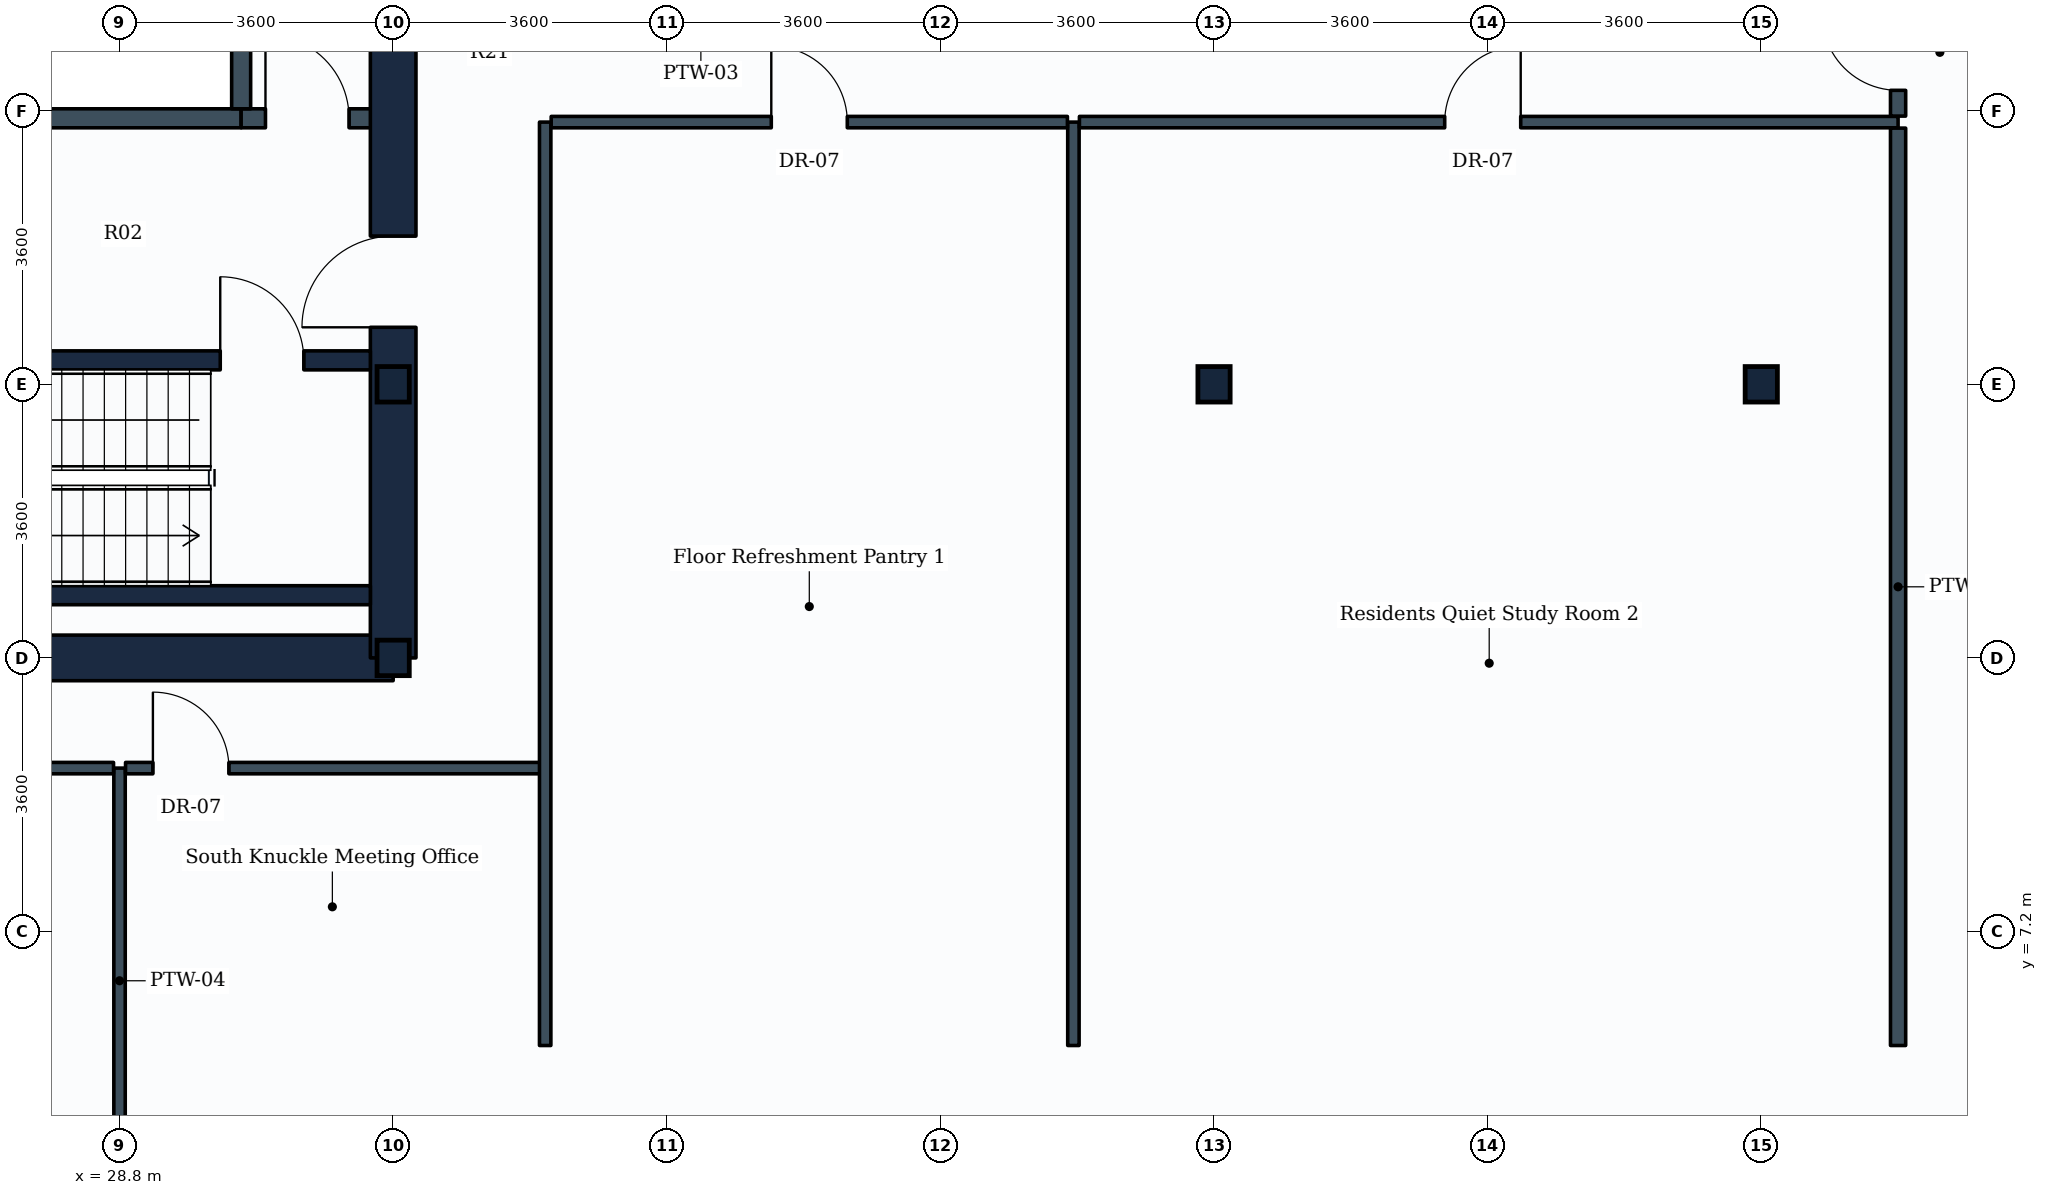
"""IFC4 building model, lengths in metres.
Left out: names, types, materials, properties, quantities, classifications, styles, units other than length and angle.
Written with IfcOpenShell. Run it as: python <this file> out.ifc"""

import sys

from ifc_helpers import new_model, si_unit, direction, frame, frame_2d, origin, origin_2d, place, context, subcontext, project, spatial, rectangle, i_section, extrude, element, fill, save


model = new_model("IFC4")
c1 = context("Model", 3, precision=1e-05, world=origin(), true_north=direction((0.0, 1.0)))
c2 = subcontext(c1, "Body", "Model", "MODEL_VIEW")
j1 = project(units=[si_unit("LENGTHUNIT", "METRE"), si_unit("PLANEANGLEUNIT", "RADIAN")], contexts=[c1])
p1 = place(None, origin())
s1 = spatial("IfcSite", under=j1, at=p1, CompositionType="ELEMENT")
p2 = place(p1, origin())
s2 = spatial("IfcBuilding", under=s1, at=p2, CompositionType="ELEMENT")
p3 = place(p2, frame((0.0, 0.0, 103.5)))
s3 = spatial("IfcBuildingStorey", under=s2, at=p3, CompositionType="ELEMENT", Elevation=103.5)
for number, where, z_axis, x_axis in (
    (1, (32.4, 10.8, 0.0), (0.0, 0.0, 1.0), (1.0, 0.0, 0.0)),
    (2, (32.4, 14.4, 0.0), (0.0, 0.0, 1.0), (1.0, 0.0, 0.0)),
    (3, (43.2, 14.4, 0.0), (0.0, 0.0, 1.0), (1.0, 0.0, 0.0)),
    (4, (50.4, 14.4, 0.0), (0.0, 0.0, 1.0), (1.0, 0.0, 0.0)),
):
    element("IfcColumn", number, at=place(p3, frame(where, z_axis=z_axis, x_axis=x_axis)), inside=s3, PredefinedType="COLUMN", context=c2, shape_type="SweptSolid", body=[
        extrude(i_section(OverallWidth=0.424, OverallDepth=0.467, WebThickness=0.033, FlangeThickness=0.053, FilletRadius=0.015, at=origin_2d()), origin(), (0.0, 0.0, 1.0), 3.9),
    ])
p4 = place(p3, frame((14.4, 10.8, 0.0), z_axis=(0.0, 0.0, 1.0), x_axis=(1.0, 0.0, 0.0)))
e5 = element("IfcWall", 5, at=p4, inside=s3, PredefinedType="SHEAR", context=c2, shape_type="SweptSolid", body=[
    extrude(rectangle(XDim=18.0, YDim=0.6, at=frame_2d((9.0, 0.0))), origin(), (0.0, 0.0, 1.0), 3.65),
])
p5 = place(p3, frame((32.4, 10.8, 0.0), z_axis=(0.0, 0.0, 1.0), x_axis=(0.0, 1.0, 0.0)))
e6 = element("IfcWall", 6, at=p5, inside=s3, PredefinedType="SHEAR", context=c2, shape_type="SweptSolid", body=[
    extrude(rectangle(XDim=14.4, YDim=0.6, at=frame_2d((7.2, 0.0))), origin(), (0.0, 0.0, 1.0), 3.65),
])
p6 = place(p5, frame((4.35, 0.0, 0.0)))
e7 = element("IfcOpeningElement", 7, at=p6, cuts=e6, PredefinedType="OPENING", context=c2, shape_type="SweptSolid", body=[
    extrude(rectangle(XDim=1.2, YDim=2.1, at=frame_2d((0.6, 1.05))), frame((0.0, 0.31, 0.0), z_axis=(0.0, -1.0, 0.0), x_axis=(1.0, 0.0, 0.0)), (0.0, 0.0, 1.0), 0.62),
])
p7 = place(p5, frame((10.0, 0.0, 0.0)))
e8 = element("IfcOpeningElement", 8, at=p7, cuts=e6, PredefinedType="OPENING", context=c2, shape_type="SweptSolid", body=[
    extrude(rectangle(XDim=1.2, YDim=2.1, at=frame_2d((0.6, 1.05))), frame((0.0, 0.31, 0.0), z_axis=(0.0, -1.0, 0.0), x_axis=(1.0, 0.0, 0.0)), (0.0, 0.0, 1.0), 0.62),
])
p8 = place(p3, frame((23.35, 11.625, 0.0), z_axis=(0.0, 0.0, 1.0), x_axis=(1.0, 0.0, 0.0)))
e9 = element("IfcWall", 9, at=p8, inside=s3, PredefinedType="SHEAR", context=c2, shape_type="SweptSolid", body=[
    extrude(rectangle(XDim=8.75, YDim=0.25, at=frame_2d((4.375, 0.0))), origin(), (0.0, 0.0, 1.0), 3.65),
])
p9 = place(p3, frame((23.35, 14.715, 0.0), z_axis=(0.0, 0.0, 1.0), x_axis=(1.0, 0.0, 0.0)))
e10 = element("IfcWall", 10, at=p9, inside=s3, PredefinedType="SHEAR", context=c2, shape_type="SweptSolid", body=[
    extrude(rectangle(XDim=8.75, YDim=0.25, at=frame_2d((4.375, 0.0))), origin(), (0.0, 0.0, 1.0), 3.65),
])
p10 = place(p9, frame((6.775, 0.0, 0.0)))
e11 = element("IfcOpeningElement", 11, at=p10, cuts=e10, PredefinedType="OPENING", context=c2, shape_type="SweptSolid", body=[
    extrude(rectangle(XDim=1.1, YDim=2.1, at=frame_2d((0.55, 1.05))), frame((0.0, 0.135, 0.0), z_axis=(0.0, -1.0, 0.0), x_axis=(1.0, 0.0, 0.0)), (0.0, 0.0, 1.0), 0.27),
])
p11 = place(p3, frame((21.88, 17.9, 0.0), z_axis=(0.0, 0.0, 1.0), x_axis=(1.0, 0.0, 0.0)))
e12 = element("IfcWall", 12, at=p11, inside=s3, PredefinedType="PARTITIONING", context=c2, shape_type="SweptSolid", body=[
    extrude(rectangle(XDim=8.52, YDim=0.25, at=frame_2d((4.26, 0.0))), origin(), (0.0, 0.0, 1.0), 3.635),
])
p12 = place(p3, frame((30.4, 17.9, 0.0), z_axis=(0.0, 0.0, 1.0), x_axis=(1.0, 0.0, 0.0)))
e13 = element("IfcWall", 13, at=p12, inside=s3, PredefinedType="PARTITIONING", context=c2, shape_type="SweptSolid", body=[
    extrude(rectangle(XDim=1.75, YDim=0.25, at=frame_2d((0.875, 0.0))), origin(), (0.0, 0.0, 1.0), 3.635),
])
p13 = place(p12, frame((0.32, 0.0, 0.0)))
e14 = element("IfcOpeningElement", 14, at=p13, cuts=e13, PredefinedType="OPENING", context=c2, shape_type="SweptSolid", body=[
    extrude(rectangle(XDim=1.1, YDim=2.1, at=frame_2d((0.55, 1.05))), frame((0.0, 0.135, 0.0), z_axis=(0.0, -1.0, 0.0), x_axis=(1.0, 0.0, 0.0)), (0.0, 0.0, 1.0), 0.27),
])
p14 = place(p3, frame((30.4, 18.025, 0.0), z_axis=(0.0, 0.0, 1.0), x_axis=(0.0, 1.0, 0.0)))
e15 = element("IfcWall", 15, at=p14, inside=s3, PredefinedType="PARTITIONING", context=c2, shape_type="SweptSolid", body=[
    extrude(rectangle(XDim=2.27, YDim=0.25, at=frame_2d((1.135, 0.0))), origin(), (0.0, 0.0, 1.0), 3.635),
])
p15 = place(p3, frame((28.8, 9.35, 0.0), z_axis=(0.0, 0.0, 1.0), x_axis=(0.0, -1.0, 0.0)))
e16 = element("IfcWall", 16, at=p15, inside=s3, PredefinedType="PARTITIONING", context=c2, shape_type="SweptSolid", body=[
    extrude(rectangle(XDim=5.596, YDim=0.15, at=frame_2d((2.798, 0.0))), origin(), (0.0, 0.0, 1.0), 3.635),
])
p16 = place(p3, frame((12.95, 9.35, 0.0), z_axis=(0.0, 0.0, 1.0), x_axis=(1.0, 0.0, 0.0)))
e17 = element("IfcWall", 17, at=p16, inside=s3, PredefinedType="PARTITIONING", context=c2, shape_type="SweptSolid", body=[
    extrude(rectangle(XDim=15.771, YDim=0.15, at=frame_2d((7.885, 0.0))), origin(), (0.0, 0.0, 1.0), 3.18),
])
p17 = place(p16, frame((4.836, 0.0, 0.0)))
e18 = element("IfcOpeningElement", 18, at=p17, cuts=e17, PredefinedType="OPENING", context=c2, shape_type="SweptSolid", body=[
    extrude(rectangle(XDim=1.0, YDim=2.1, at=frame_2d((0.5, 1.05))), frame((0.0, 0.085, 0.0), z_axis=(0.0, -1.0, 0.0), x_axis=(1.0, 0.0, 0.0)), (0.0, 0.0, 1.0), 0.17),
])
p18 = place(p3, frame((28.879, 9.35, 0.0), z_axis=(0.0, 0.0, 1.0), x_axis=(1.0, 0.0, 0.0)))
e19 = element("IfcWall", 19, at=p18, inside=s3, PredefinedType="PARTITIONING", context=c2, shape_type="SweptSolid", body=[
    extrude(rectangle(XDim=5.521, YDim=0.15, at=frame_2d((2.76, 0.0))), origin(), (0.0, 0.0, 1.0), 3.635),
])
p19 = place(p18, frame((0.36, 0.0, 0.0)))
e20 = element("IfcOpeningElement", 20, at=p19, cuts=e19, PredefinedType="OPENING", context=c2, shape_type="SweptSolid", body=[
    extrude(rectangle(XDim=1.0, YDim=2.1, at=frame_2d((0.5, 1.05))), frame((0.0, 0.085, 0.0), z_axis=(0.0, -1.0, 0.0), x_axis=(1.0, 0.0, 0.0)), (0.0, 0.0, 1.0), 0.17),
])
for number, where, z_axis, x_axis in (
    (21, (34.4, 5.7, 0.0), (0.0, 0.0, 1.0), (0.0, 1.0, 0.0)),
    (22, (41.35, 5.7, 0.0), (0.0, 0.0, 1.0), (0.0, 1.0, 0.0)),
):
    element("IfcWall", number, at=place(p3, frame(where, z_axis=z_axis, x_axis=x_axis)), inside=s3, PredefinedType="PARTITIONING", context=c2, shape_type="SweptSolid", body=[
        extrude(rectangle(XDim=12.15, YDim=0.15, at=frame_2d((6.075, 0.0))), origin(), (0.0, 0.0, 1.0), 3.18),
    ])
p20 = place(p3, frame((34.479, 17.85, 0.0), z_axis=(0.0, 0.0, 1.0), x_axis=(1.0, 0.0, 0.0)))
e23 = element("IfcWall", 23, at=p20, inside=s3, PredefinedType="PARTITIONING", context=c2, shape_type="SweptSolid", body=[
    extrude(rectangle(XDim=6.792, YDim=0.15, at=frame_2d((3.396, 0.0))), origin(), (0.0, 0.0, 1.0), 3.18),
])
p21 = place(p20, frame((2.896, 0.0, 0.0)))
e24 = element("IfcOpeningElement", 24, at=p21, cuts=e23, PredefinedType="OPENING", context=c2, shape_type="SweptSolid", body=[
    extrude(rectangle(XDim=1.0, YDim=2.1, at=frame_2d((0.5, 1.05))), frame((0.0, 0.085, 0.0), z_axis=(0.0, -1.0, 0.0), x_axis=(1.0, 0.0, 0.0)), (0.0, 0.0, 1.0), 0.17),
])
p22 = place(p3, frame((41.429, 17.85, 0.0), z_axis=(0.0, 0.0, 1.0), x_axis=(1.0, 0.0, 0.0)))
e25 = element("IfcWall", 25, at=p22, inside=s3, PredefinedType="PARTITIONING", context=c2, shape_type="SweptSolid", body=[
    extrude(rectangle(XDim=10.771, YDim=0.15, at=frame_2d((5.385, 0.0))), origin(), (0.0, 0.0, 1.0), 3.18),
])
p23 = place(p22, frame((4.806, 0.0, 0.0)))
e26 = element("IfcOpeningElement", 26, at=p23, cuts=e25, PredefinedType="OPENING", context=c2, shape_type="SweptSolid", body=[
    extrude(rectangle(XDim=1.0, YDim=2.1, at=frame_2d((0.5, 1.05))), frame((0.0, 0.085, 0.0), z_axis=(0.0, -1.0, 0.0), x_axis=(1.0, 0.0, 0.0)), (0.0, 0.0, 1.0), 0.17),
])
p24 = place(p3, frame((52.2, 5.7, 0.0), z_axis=(0.0, 0.0, 1.0), x_axis=(0.0, 1.0, 0.0)))
e27 = element("IfcWall", 27, at=p24, inside=s3, PredefinedType="PARTITIONING", context=c2, shape_type="SweptSolid", body=[
    extrude(rectangle(XDim=12.071, YDim=0.2, at=frame_2d((6.036, 0.0))), origin(), (0.0, 0.0, 1.0), 3.18),
])
p25 = place(p3, frame((52.2, 17.929, 0.0), z_axis=(0.0, 0.0, 1.0), x_axis=(0.0, 1.0, 0.0)))
e28 = element("IfcWall", 28, at=p25, inside=s3, PredefinedType="PARTITIONING", context=c2, shape_type="SweptSolid", body=[
    extrude(rectangle(XDim=1.692, YDim=0.2, at=frame_2d((0.846, 0.0))), origin(), (0.0, 0.0, 1.0), 3.635),
])
p26 = place(p25, frame((0.339, 0.0, 0.0)))
e29 = element("IfcOpeningElement", 29, at=p26, cuts=e28, PredefinedType="OPENING", context=c2, shape_type="SweptSolid", body=[
    extrude(rectangle(XDim=1.0, YDim=2.1, at=frame_2d((0.5, 1.05))), frame((0.0, 0.11, 0.0), z_axis=(0.0, -1.0, 0.0), x_axis=(1.0, 0.0, 0.0)), (0.0, 0.0, 1.0), 0.22),
])
p27 = place(p10, origin())
e30 = element("IfcDoor", 30, at=p27, inside=s3, OperationType="SINGLE_SWING_LEFT", PredefinedType="DOOR", context=c2, shape_type="SweptSolid", body=[
    extrude(rectangle(XDim=1.1, YDim=2.1, at=frame_2d((0.55, 1.05))), frame((0.0, 0.025, 0.0), z_axis=(0.0, -1.0, 0.0), x_axis=(1.0, 0.0, 0.0)), (0.0, 0.0, 1.0), 0.05),
])
fill(e11, e30)
p28 = place(p6, origin())
e31 = element("IfcDoor", 31, at=p28, inside=s3, OperationType="SINGLE_SWING_LEFT", PredefinedType="DOOR", context=c2, shape_type="SweptSolid", body=[
    extrude(rectangle(XDim=1.2, YDim=2.1, at=frame_2d((0.6, 1.05))), frame((0.0, 0.025, 0.0), z_axis=(0.0, -1.0, 0.0), x_axis=(1.0, 0.0, 0.0)), (0.0, 0.0, 1.0), 0.05),
])
fill(e7, e31)
p29 = place(p13, origin())
e32 = element("IfcDoor", 32, at=p29, inside=s3, OperationType="SINGLE_SWING_LEFT", PredefinedType="DOOR", context=c2, shape_type="SweptSolid", body=[
    extrude(rectangle(XDim=1.1, YDim=2.1, at=frame_2d((0.55, 1.05))), frame((0.0, 0.025, 0.0), z_axis=(0.0, -1.0, 0.0), x_axis=(1.0, 0.0, 0.0)), (0.0, 0.0, 1.0), 0.05),
])
fill(e14, e32)
p30 = place(p19, origin())
e33 = element("IfcDoor", 33, at=p30, inside=s3, OperationType="SINGLE_SWING_LEFT", PredefinedType="DOOR", context=c2, shape_type="SweptSolid", body=[
    extrude(rectangle(XDim=1.0, YDim=2.1, at=frame_2d((0.5, 1.05))), frame((0.0, 0.025, 0.0), z_axis=(0.0, -1.0, 0.0), x_axis=(1.0, 0.0, 0.0)), (0.0, 0.0, 1.0), 0.05),
])
fill(e20, e33)
p31 = place(p21, origin())
e34 = element("IfcDoor", 34, at=p31, inside=s3, OperationType="SINGLE_SWING_LEFT", PredefinedType="DOOR", context=c2, shape_type="SweptSolid", body=[
    extrude(rectangle(XDim=1.0, YDim=2.1, at=frame_2d((0.5, 1.05))), frame((0.0, 0.025, 0.0), z_axis=(0.0, -1.0, 0.0), x_axis=(1.0, 0.0, 0.0)), (0.0, 0.0, 1.0), 0.05),
])
fill(e24, e34)
p32 = place(p23, origin())
e35 = element("IfcDoor", 35, at=p32, inside=s3, OperationType="SINGLE_SWING_RIGHT", PredefinedType="DOOR", context=c2, shape_type="SweptSolid", body=[
    extrude(rectangle(XDim=1.0, YDim=2.1, at=frame_2d((0.5, 1.05))), frame((0.0, 0.025, 0.0), z_axis=(0.0, -1.0, 0.0), x_axis=(1.0, 0.0, 0.0)), (0.0, 0.0, 1.0), 0.05),
])
fill(e26, e35)
p33 = place(p26, origin())
e36 = element("IfcDoor", 36, at=p33, inside=s3, OperationType="SINGLE_SWING_RIGHT", PredefinedType="DOOR", context=c2, shape_type="SweptSolid", body=[
    extrude(rectangle(XDim=1.0, YDim=2.1, at=frame_2d((0.5, 1.05))), frame((0.0, 0.025, 0.0), z_axis=(0.0, -1.0, 0.0), x_axis=(1.0, 0.0, 0.0)), (0.0, 0.0, 1.0), 0.05),
])
fill(e29, e36)
save(model, sys.argv[1])
